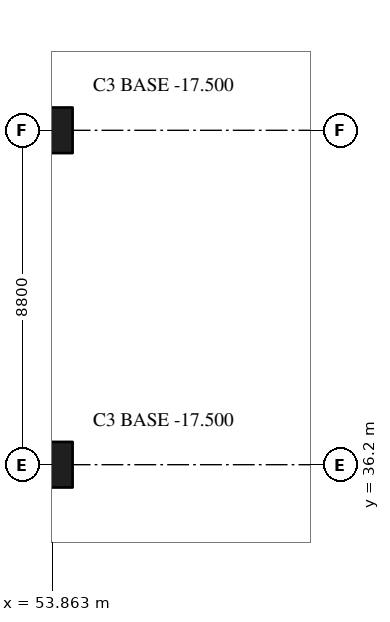
"""IFC4 building model, lengths in metres.
Left out: names, types, materials, properties, quantities, classifications, styles, units other than length and angle.
Written with IfcOpenShell. Run it as: python <this file> out.ifc"""

import sys

from ifc_helpers import new_model, si_unit, direction, frame, origin, origin_2d, place, context, subcontext, project, spatial, rectangle, extrude, element, save


model = new_model("IFC4")
c1 = context("Model", 3, precision=1e-05, world=origin(), true_north=direction((0.0, 1.0)))
c2 = subcontext(c1, "Body", "Model", "MODEL_VIEW")
j1 = project(units=[si_unit("LENGTHUNIT", "METRE"), si_unit("PLANEANGLEUNIT", "RADIAN")], contexts=[c1])
p1 = place(None, origin())
s1 = spatial("IfcSite", under=j1, at=p1, CompositionType="ELEMENT")
p2 = place(p1, origin())
s2 = spatial("IfcBuilding", under=s1, at=p2, CompositionType="ELEMENT")
p3 = place(p2, frame((0.0, 0.0, -17.0)))
s3 = spatial("IfcBuildingStorey", under=s2, at=p3, CompositionType="ELEMENT", Elevation=-17.0)
for number, where, z_axis, x_axis in (
    (1, (53.8, 36.2, -0.5), (0.0, 0.0, 1.0), (1.0, 0.0, 0.0)),
    (2, (53.8, 45.0, -0.5), (0.0, 0.0, 1.0), (1.0, 0.0, 0.0)),
):
    element("IfcColumn", number, at=place(p3, frame(where, z_axis=z_axis, x_axis=x_axis)), inside=s3, PredefinedType="COLUMN", context=c2, shape_type="SweptSolid", body=[
        extrude(rectangle(XDim=1.2, YDim=1.2, at=origin_2d()), origin(), (0.0, 0.0, 1.0), 5.5),
    ])
save(model, sys.argv[1])
